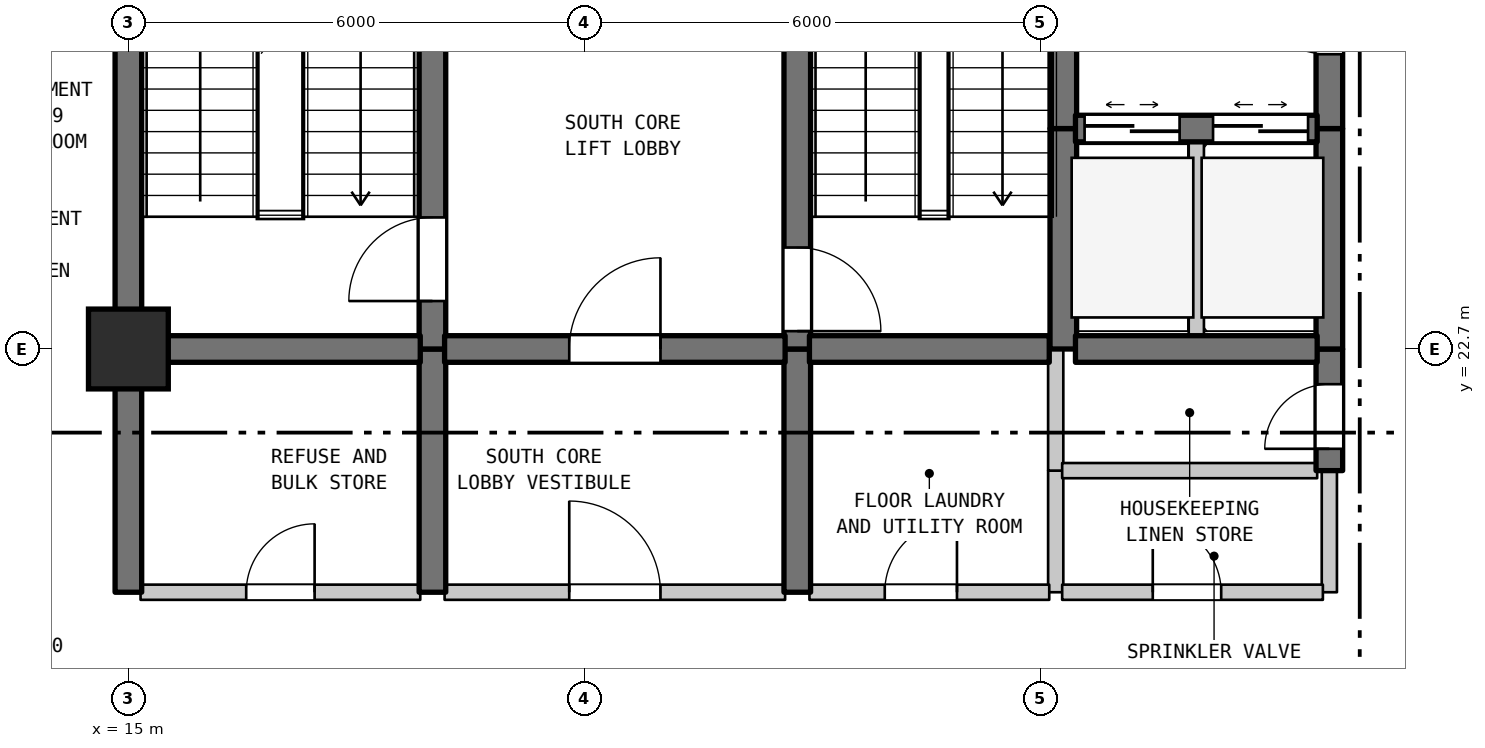
"""IFC4 building model, lengths in metres.
Left out: names, types, materials, properties, quantities, classifications, styles, units other than length and angle.
Written with IfcOpenShell. Run it as: python <this file> out.ifc"""

import sys

from ifc_helpers import new_model, si_unit, direction, frame, frame_2d, origin, origin_2d, place, context, subcontext, project, spatial, rectangle, extrude, element, fill, save


model = new_model("IFC4")
c1 = context("Model", 3, precision=1e-05, world=origin(), true_north=direction((0.0, 1.0)))
c2 = subcontext(c1, "Body", "Model", "MODEL_VIEW")
j1 = project(units=[si_unit("LENGTHUNIT", "METRE"), si_unit("PLANEANGLEUNIT", "RADIAN")], contexts=[c1])
p1 = place(None, origin())
s1 = spatial("IfcSite", under=j1, at=p1, CompositionType="ELEMENT")
p2 = place(p1, origin())
s2 = spatial("IfcBuilding", under=s1, at=p2, CompositionType="ELEMENT")
p3 = place(p2, frame((0.0, 0.0, 113.1)))
s3 = spatial("IfcBuildingStorey", under=s2, at=p3, CompositionType="ELEMENT", Elevation=113.1)
p4 = place(p3, frame((15.0, 22.7, 0.0), z_axis=(0.0, 0.0, 1.0), x_axis=(1.0, 0.0, 0.0)))
e1 = element("IfcColumn", 1, at=p4, inside=s3, PredefinedType="COLUMN", context=c2, shape_type="SweptSolid", body=[
    extrude(rectangle(XDim=1.05, YDim=1.05, at=origin_2d()), origin(), (0.0, 0.0, 1.0), 3.7),
])
p5 = place(p3, frame((15.0, 19.5, 0.0), z_axis=(0.0, 0.0, 1.0), x_axis=(0.0, 1.0, 0.0)))
e2 = element("IfcWall", 2, at=p5, inside=s3, PredefinedType="SHEAR", context=c2, shape_type="SweptSolid", body=[
    extrude(rectangle(XDim=3.2, YDim=0.35, at=frame_2d((1.6, 0.0))), origin(), (0.0, 0.0, 1.0), 3.385),
])
p6 = place(p3, frame((15.0, 22.7, 0.0), z_axis=(0.0, 0.0, 1.0), x_axis=(0.0, 1.0, 0.0)))
e3 = element("IfcWall", 3, at=p6, inside=s3, PredefinedType="SHEAR", context=c2, shape_type="SweptSolid", body=[
    extrude(rectangle(XDim=6.8, YDim=0.35, at=frame_2d((3.4, 0.0))), origin(), (0.0, 0.0, 1.0), 3.385),
])
p7 = place(p3, frame((19.0, 19.5, 0.0), z_axis=(0.0, 0.0, 1.0), x_axis=(0.0, 1.0, 0.0)))
e4 = element("IfcWall", 4, at=p7, inside=s3, PredefinedType="SHEAR", context=c2, shape_type="SweptSolid", body=[
    extrude(rectangle(XDim=3.2, YDim=0.35, at=frame_2d((1.6, 0.0))), origin(), (0.0, 0.0, 1.0), 3.385),
])
p8 = place(p3, frame((19.0, 22.7, 0.0), z_axis=(0.0, 0.0, 1.0), x_axis=(0.0, 1.0, 0.0)))
e5 = element("IfcWall", 5, at=p8, inside=s3, PredefinedType="SHEAR", context=c2, shape_type="SweptSolid", body=[
    extrude(rectangle(XDim=5.5, YDim=0.35, at=frame_2d((2.75, 0.0))), origin(), (0.0, 0.0, 1.0), 3.385),
])
p9 = place(p8, frame((0.631, 0.0, 0.0)))
e6 = element("IfcOpeningElement", 6, at=p9, cuts=e5, PredefinedType="OPENING", context=c2, shape_type="SweptSolid", body=[
    extrude(rectangle(XDim=1.1, YDim=2.15, at=frame_2d((0.55, 1.075))), frame((0.0, 0.185, 0.0), z_axis=(0.0, -1.0, 0.0), x_axis=(1.0, 0.0, 0.0)), (0.0, 0.0, 1.0), 0.37),
])
p10 = place(p3, frame((23.8, 19.5, 0.0), z_axis=(0.0, 0.0, 1.0), x_axis=(0.0, 1.0, 0.0)))
e7 = element("IfcWall", 7, at=p10, inside=s3, PredefinedType="SHEAR", context=c2, shape_type="SweptSolid", body=[
    extrude(rectangle(XDim=3.2, YDim=0.35, at=frame_2d((1.6, 0.0))), origin(), (0.0, 0.0, 1.0), 3.385),
])
p11 = place(p3, frame((23.8, 22.7, 0.0), z_axis=(0.0, 0.0, 1.0), x_axis=(0.0, 1.0, 0.0)))
e8 = element("IfcWall", 8, at=p11, inside=s3, PredefinedType="SHEAR", context=c2, shape_type="SweptSolid", body=[
    extrude(rectangle(XDim=5.5, YDim=0.35, at=frame_2d((2.75, 0.0))), origin(), (0.0, 0.0, 1.0), 3.385),
])
p12 = place(p11, frame((0.235, 0.0, 0.0)))
e9 = element("IfcOpeningElement", 9, at=p12, cuts=e8, PredefinedType="OPENING", context=c2, shape_type="SweptSolid", body=[
    extrude(rectangle(XDim=1.1, YDim=2.15, at=frame_2d((0.55, 1.075))), frame((0.0, 0.185, 0.0), z_axis=(0.0, -1.0, 0.0), x_axis=(1.0, 0.0, 0.0)), (0.0, 0.0, 1.0), 0.37),
])
p13 = place(p3, frame((27.2, 19.5, 0.0), z_axis=(0.0, 0.0, 1.0), x_axis=(0.0, 1.0, 0.0)))
e10 = element("IfcWall", 10, at=p13, inside=s3, PredefinedType="STANDARD", context=c2, shape_type="SweptSolid", body=[
    extrude(rectangle(XDim=1.6, YDim=0.2, at=frame_2d((0.8, 0.0))), origin(), (0.0, 0.0, 1.0), 3.385),
])
p14 = place(p3, frame((27.2, 21.1, 0.0), z_axis=(0.0, 0.0, 1.0), x_axis=(0.0, 1.0, 0.0)))
e11 = element("IfcWall", 11, at=p14, inside=s3, PredefinedType="STANDARD", context=c2, shape_type="SweptSolid", body=[
    extrude(rectangle(XDim=1.6, YDim=0.2, at=frame_2d((0.8, 0.0))), origin(), (0.0, 0.0, 1.0), 3.385),
])
p15 = place(p3, frame((27.3, 22.7, 0.0), z_axis=(0.0, 0.0, 1.0), x_axis=(0.0, 1.0, 0.0)))
e12 = element("IfcWall", 12, at=p15, inside=s3, PredefinedType="SHEAR", context=c2, shape_type="SweptSolid", body=[
    extrude(rectangle(XDim=2.9, YDim=0.35, at=frame_2d((1.45, 0.0))), origin(), (0.0, 0.0, 1.0), 3.385),
])
p16 = place(p3, frame((27.3, 25.6, 0.0), z_axis=(0.0, 0.0, 1.0), x_axis=(0.0, 1.0, 0.0)))
e13 = element("IfcWall", 13, at=p16, inside=s3, PredefinedType="SHEAR", context=c2, shape_type="SweptSolid", body=[
    extrude(rectangle(XDim=3.3, YDim=0.35, at=frame_2d((1.65, 0.0))), origin(), (0.0, 0.0, 1.0), 3.385),
])
p17 = place(p3, frame((29.05, 22.7, 0.0), z_axis=(0.0, 0.0, 1.0), x_axis=(0.0, 1.0, 0.0)))
e14 = element("IfcWall", 14, at=p17, inside=s3, PredefinedType="STANDARD", context=c2, shape_type="SweptSolid", body=[
    extrude(rectangle(XDim=2.9, YDim=0.2, at=frame_2d((1.45, 0.0))), origin(), (0.0, 0.0, 1.0), 3.385),
])
p18 = place(p3, frame((30.8, 19.5, 0.0), z_axis=(0.0, 0.0, 1.0), x_axis=(0.0, 1.0, 0.0)))
e15 = element("IfcWall", 15, at=p18, inside=s3, PredefinedType="STANDARD", context=c2, shape_type="SweptSolid", body=[
    extrude(rectangle(XDim=1.6, YDim=0.2, at=frame_2d((0.8, 0.0))), origin(), (0.0, 0.0, 1.0), 3.385),
])
p19 = place(p3, frame((30.8, 21.1, 0.0), z_axis=(0.0, 0.0, 1.0), x_axis=(0.0, 1.0, 0.0)))
e16 = element("IfcWall", 16, at=p19, inside=s3, PredefinedType="SHEAR", context=c2, shape_type="SweptSolid", body=[
    extrude(rectangle(XDim=1.6, YDim=0.35, at=frame_2d((0.8, 0.0))), origin(), (0.0, 0.0, 1.0), 3.385),
])
p20 = place(p19, frame((0.287, 0.0, 0.0)))
e17 = element("IfcOpeningElement", 17, at=p20, cuts=e16, PredefinedType="OPENING", context=c2, shape_type="SweptSolid", body=[
    extrude(rectangle(XDim=0.85, YDim=2.1, at=frame_2d((0.425, 1.05))), frame((0.0, 0.185, 0.0), z_axis=(0.0, -1.0, 0.0), x_axis=(1.0, 0.0, 0.0)), (0.0, 0.0, 1.0), 0.37),
])
p21 = place(p3, frame((30.8, 22.7, 0.0), z_axis=(0.0, 0.0, 1.0), x_axis=(0.0, 1.0, 0.0)))
e18 = element("IfcWall", 18, at=p21, inside=s3, PredefinedType="SHEAR", context=c2, shape_type="SweptSolid", body=[
    extrude(rectangle(XDim=2.9, YDim=0.35, at=frame_2d((1.45, 0.0))), origin(), (0.0, 0.0, 1.0), 3.385),
])
p22 = place(p3, frame((30.8, 25.6, 0.0), z_axis=(0.0, 0.0, 1.0), x_axis=(0.0, 1.0, 0.0)))
e19 = element("IfcWall", 19, at=p22, inside=s3, PredefinedType="SHEAR", context=c2, shape_type="SweptSolid", body=[
    extrude(rectangle(XDim=3.3, YDim=0.35, at=frame_2d((1.65, 0.0))), origin(), (0.0, 0.0, 1.0), 3.385),
])
p23 = place(p22, frame((0.978, 0.0, 0.0)))
e20 = element("IfcOpeningElement", 20, at=p23, cuts=e19, PredefinedType="OPENING", context=c2, shape_type="SweptSolid", body=[
    extrude(rectangle(XDim=1.2, YDim=2.2, at=frame_2d((0.6, 1.1))), frame((0.0, 0.185, 0.0), z_axis=(0.0, -1.0, 0.0), x_axis=(1.0, 0.0, 0.0)), (0.0, 0.0, 1.0), 0.37),
])
p24 = place(p3, frame((15.16, 19.5, 0.0), z_axis=(0.0, 0.0, 1.0), x_axis=(1.0, 0.0, 0.0)))
e21 = element("IfcWall", 21, at=p24, inside=s3, PredefinedType="STANDARD", context=c2, shape_type="SweptSolid", body=[
    extrude(rectangle(XDim=3.68, YDim=0.2, at=frame_2d((1.84, 0.0))), origin(), (0.0, 0.0, 1.0), 3.385),
])
p25 = place(p24, frame((1.39, 0.0, 0.0)))
e22 = element("IfcOpeningElement", 22, at=p25, cuts=e21, PredefinedType="OPENING", context=c2, shape_type="SweptSolid", body=[
    extrude(rectangle(XDim=0.9, YDim=2.15, at=frame_2d((0.45, 1.075))), frame((0.0, 0.11, 0.0), z_axis=(0.0, -1.0, 0.0), x_axis=(1.0, 0.0, 0.0)), (0.0, 0.0, 1.0), 0.22),
])
p26 = place(p3, frame((19.16, 19.5, 0.0), z_axis=(0.0, 0.0, 1.0), x_axis=(1.0, 0.0, 0.0)))
e23 = element("IfcWall", 23, at=p26, inside=s3, PredefinedType="STANDARD", context=c2, shape_type="SweptSolid", body=[
    extrude(rectangle(XDim=4.48, YDim=0.2, at=frame_2d((2.24, 0.0))), origin(), (0.0, 0.0, 1.0), 3.385),
])
p27 = place(p26, frame((1.64, 0.0, 0.0)))
e24 = element("IfcOpeningElement", 24, at=p27, cuts=e23, PredefinedType="OPENING", context=c2, shape_type="SweptSolid", body=[
    extrude(rectangle(XDim=1.2, YDim=2.2, at=frame_2d((0.6, 1.1))), frame((0.0, 0.11, 0.0), z_axis=(0.0, -1.0, 0.0), x_axis=(1.0, 0.0, 0.0)), (0.0, 0.0, 1.0), 0.22),
])
p28 = place(p3, frame((23.96, 19.5, 0.0), z_axis=(0.0, 0.0, 1.0), x_axis=(1.0, 0.0, 0.0)))
e25 = element("IfcWall", 25, at=p28, inside=s3, PredefinedType="STANDARD", context=c2, shape_type="SweptSolid", body=[
    extrude(rectangle(XDim=3.155, YDim=0.2, at=frame_2d((1.578, 0.0))), origin(), (0.0, 0.0, 1.0), 3.385),
])
p29 = place(p28, frame((0.991, 0.0, 0.0)))
e26 = element("IfcOpeningElement", 26, at=p29, cuts=e25, PredefinedType="OPENING", context=c2, shape_type="SweptSolid", body=[
    extrude(rectangle(XDim=0.95, YDim=2.15, at=frame_2d((0.475, 1.075))), frame((0.0, 0.11, 0.0), z_axis=(0.0, -1.0, 0.0), x_axis=(1.0, 0.0, 0.0)), (0.0, 0.0, 1.0), 0.22),
])
p30 = place(p3, frame((27.285, 19.5, 0.0), z_axis=(0.0, 0.0, 1.0), x_axis=(1.0, 0.0, 0.0)))
e27 = element("IfcWall", 27, at=p30, inside=s3, PredefinedType="STANDARD", context=c2, shape_type="SweptSolid", body=[
    extrude(rectangle(XDim=3.43, YDim=0.2, at=frame_2d((1.715, 0.0))), origin(), (0.0, 0.0, 1.0), 3.385),
])
p31 = place(p30, frame((1.192, 0.0, 0.0)))
e28 = element("IfcOpeningElement", 28, at=p31, cuts=e27, PredefinedType="OPENING", context=c2, shape_type="SweptSolid", body=[
    extrude(rectangle(XDim=0.9, YDim=2.15, at=frame_2d((0.45, 1.075))), frame((0.0, 0.11, 0.0), z_axis=(0.0, -1.0, 0.0), x_axis=(1.0, 0.0, 0.0)), (0.0, 0.0, 1.0), 0.22),
])
p32 = place(p3, frame((27.285, 21.1, 0.0), z_axis=(0.0, 0.0, 1.0), x_axis=(1.0, 0.0, 0.0)))
e29 = element("IfcWall", 29, at=p32, inside=s3, PredefinedType="STANDARD", context=c2, shape_type="SweptSolid", body=[
    extrude(rectangle(XDim=3.355, YDim=0.2, at=frame_2d((1.677, 0.0))), origin(), (0.0, 0.0, 1.0), 3.385),
])
p33 = place(p3, frame((15.16, 22.7, 0.0), z_axis=(0.0, 0.0, 1.0), x_axis=(1.0, 0.0, 0.0)))
e30 = element("IfcWall", 30, at=p33, inside=s3, PredefinedType="SHEAR", context=c2, shape_type="SweptSolid", body=[
    extrude(rectangle(XDim=3.68, YDim=0.35, at=frame_2d((1.84, 0.0))), origin(), (0.0, 0.0, 1.0), 3.385),
])
p34 = place(p3, frame((19.16, 22.7, 0.0), z_axis=(0.0, 0.0, 1.0), x_axis=(1.0, 0.0, 0.0)))
e31 = element("IfcWall", 31, at=p34, inside=s3, PredefinedType="SHEAR", context=c2, shape_type="SweptSolid", body=[
    extrude(rectangle(XDim=4.48, YDim=0.35, at=frame_2d((2.24, 0.0))), origin(), (0.0, 0.0, 1.0), 3.385),
])
p35 = place(p34, frame((1.64, 0.0, 0.0)))
e32 = element("IfcOpeningElement", 32, at=p35, cuts=e31, PredefinedType="OPENING", context=c2, shape_type="SweptSolid", body=[
    extrude(rectangle(XDim=1.2, YDim=2.2, at=frame_2d((0.6, 1.1))), frame((0.0, 0.185, 0.0), z_axis=(0.0, -1.0, 0.0), x_axis=(1.0, 0.0, 0.0)), (0.0, 0.0, 1.0), 0.37),
])
p36 = place(p3, frame((23.96, 22.7, 0.0), z_axis=(0.0, 0.0, 1.0), x_axis=(1.0, 0.0, 0.0)))
e33 = element("IfcWall", 33, at=p36, inside=s3, PredefinedType="SHEAR", context=c2, shape_type="SweptSolid", body=[
    extrude(rectangle(XDim=3.155, YDim=0.35, at=frame_2d((1.578, 0.0))), origin(), (0.0, 0.0, 1.0), 3.385),
])
p37 = place(p3, frame((27.46, 22.7, 0.0), z_axis=(0.0, 0.0, 1.0), x_axis=(1.0, 0.0, 0.0)))
e34 = element("IfcWall", 34, at=p37, inside=s3, PredefinedType="SHEAR", context=c2, shape_type="SweptSolid", body=[
    extrude(rectangle(XDim=3.18, YDim=0.35, at=frame_2d((1.59, 0.0))), origin(), (0.0, 0.0, 1.0), 3.385),
])
p38 = place(p3, frame((27.46, 25.6, 0.0), z_axis=(0.0, 0.0, 1.0), x_axis=(1.0, 0.0, 0.0)))
e35 = element("IfcWall", 35, at=p38, inside=s3, PredefinedType="SHEAR", context=c2, shape_type="SweptSolid", body=[
    extrude(rectangle(XDim=3.18, YDim=0.35, at=frame_2d((1.59, 0.0))), origin(), (0.0, 0.0, 1.0), 3.385),
])
p39 = place(p38, frame((0.12, 0.0, 0.0)))
e36 = element("IfcOpeningElement", 36, at=p39, cuts=e35, PredefinedType="OPENING", context=c2, shape_type="SweptSolid", body=[
    extrude(rectangle(XDim=1.25, YDim=2.2, at=frame_2d((0.625, 1.1))), frame((0.0, 0.185, 0.0), z_axis=(0.0, -1.0, 0.0), x_axis=(1.0, 0.0, 0.0)), (0.0, 0.0, 1.0), 0.37),
])
p40 = place(p38, frame((1.81, 0.0, 0.0)))
e37 = element("IfcOpeningElement", 37, at=p40, cuts=e35, PredefinedType="OPENING", context=c2, shape_type="SweptSolid", body=[
    extrude(rectangle(XDim=1.25, YDim=2.2, at=frame_2d((0.625, 1.1))), frame((0.0, 0.185, 0.0), z_axis=(0.0, -1.0, 0.0), x_axis=(1.0, 0.0, 0.0)), (0.0, 0.0, 1.0), 0.37),
])
p41 = place(p9, origin())
e38 = element("IfcDoor", 38, at=p41, inside=s3, OperationType="SINGLE_SWING_LEFT", PredefinedType="DOOR", context=c2, shape_type="SweptSolid", body=[
    extrude(rectangle(XDim=1.1, YDim=2.15, at=frame_2d((0.55, 1.075))), frame((0.0, 0.025, 0.0), z_axis=(0.0, -1.0, 0.0), x_axis=(1.0, 0.0, 0.0)), (0.0, 0.0, 1.0), 0.05),
])
fill(e6, e38)
p42 = place(p12, frame((1.1, 0.0, 0.0), z_axis=(0.0, 0.0, 1.0), x_axis=(-1.0, 0.0, 0.0)))
e39 = element("IfcDoor", 39, at=p42, inside=s3, OperationType="SINGLE_SWING_LEFT", PredefinedType="DOOR", context=c2, shape_type="SweptSolid", body=[
    extrude(rectangle(XDim=1.1, YDim=2.15, at=frame_2d((0.55, 1.075))), frame((0.0, 0.025, 0.0), z_axis=(0.0, -1.0, 0.0), x_axis=(1.0, 0.0, 0.0)), (0.0, 0.0, 1.0), 0.05),
])
fill(e9, e39)
p43 = place(p20, origin())
e40 = element("IfcDoor", 40, at=p43, inside=s3, OperationType="SINGLE_SWING_LEFT", PredefinedType="DOOR", context=c2, shape_type="SweptSolid", body=[
    extrude(rectangle(XDim=0.85, YDim=2.1, at=frame_2d((0.425, 1.05))), frame((0.0, 0.025, 0.0), z_axis=(0.0, -1.0, 0.0), x_axis=(1.0, 0.0, 0.0)), (0.0, 0.0, 1.0), 0.05),
])
fill(e17, e40)
p44 = place(p23, origin())
e41 = element("IfcDoor", 41, at=p44, inside=s3, OperationType="SINGLE_SWING_RIGHT", PredefinedType="DOOR", context=c2, shape_type="SweptSolid", body=[
    extrude(rectangle(XDim=1.2, YDim=2.2, at=frame_2d((0.6, 1.1))), frame((0.0, 0.025, 0.0), z_axis=(0.0, -1.0, 0.0), x_axis=(1.0, 0.0, 0.0)), (0.0, 0.0, 1.0), 0.05),
])
fill(e20, e41)
p45 = place(p25, origin())
e42 = element("IfcDoor", 42, at=p45, inside=s3, OperationType="SINGLE_SWING_RIGHT", PredefinedType="DOOR", context=c2, shape_type="SweptSolid", body=[
    extrude(rectangle(XDim=0.9, YDim=2.15, at=frame_2d((0.45, 1.075))), frame((0.0, 0.025, 0.0), z_axis=(0.0, -1.0, 0.0), x_axis=(1.0, 0.0, 0.0)), (0.0, 0.0, 1.0), 0.05),
])
fill(e22, e42)
p46 = place(p27, origin())
e43 = element("IfcDoor", 43, at=p46, inside=s3, OperationType="SINGLE_SWING_LEFT", PredefinedType="DOOR", context=c2, shape_type="SweptSolid", body=[
    extrude(rectangle(XDim=1.2, YDim=2.2, at=frame_2d((0.6, 1.1))), frame((0.0, 0.025, 0.0), z_axis=(0.0, -1.0, 0.0), x_axis=(1.0, 0.0, 0.0)), (0.0, 0.0, 1.0), 0.05),
])
fill(e24, e43)
p47 = place(p29, origin())
e44 = element("IfcDoor", 44, at=p47, inside=s3, OperationType="SINGLE_SWING_RIGHT", PredefinedType="DOOR", context=c2, shape_type="SweptSolid", body=[
    extrude(rectangle(XDim=0.95, YDim=2.15, at=frame_2d((0.475, 1.075))), frame((0.0, 0.025, 0.0), z_axis=(0.0, -1.0, 0.0), x_axis=(1.0, 0.0, 0.0)), (0.0, 0.0, 1.0), 0.05),
])
fill(e26, e44)
p48 = place(p31, origin())
e45 = element("IfcDoor", 45, at=p48, inside=s3, OperationType="SINGLE_SWING_LEFT", PredefinedType="DOOR", context=c2, shape_type="SweptSolid", body=[
    extrude(rectangle(XDim=0.9, YDim=2.15, at=frame_2d((0.45, 1.075))), frame((0.0, 0.025, 0.0), z_axis=(0.0, -1.0, 0.0), x_axis=(1.0, 0.0, 0.0)), (0.0, 0.0, 1.0), 0.05),
])
fill(e28, e45)
p49 = place(p35, origin())
e46 = element("IfcDoor", 46, at=p49, inside=s3, OperationType="SINGLE_SWING_RIGHT", PredefinedType="DOOR", context=c2, shape_type="SweptSolid", body=[
    extrude(rectangle(XDim=1.2, YDim=2.2, at=frame_2d((0.6, 1.1))), frame((0.0, 0.025, 0.0), z_axis=(0.0, -1.0, 0.0), x_axis=(1.0, 0.0, 0.0)), (0.0, 0.0, 1.0), 0.05),
])
fill(e32, e46)
p50 = place(p39, origin())
e47 = element("IfcDoor", 47, at=p50, inside=s3, OperationType="DOUBLE_DOOR_SLIDING", PredefinedType="DOOR", context=c2, shape_type="SweptSolid", body=[
    extrude(rectangle(XDim=1.25, YDim=2.2, at=frame_2d((0.625, 1.1))), frame((0.0, 0.025, 0.0), z_axis=(0.0, -1.0, 0.0), x_axis=(1.0, 0.0, 0.0)), (0.0, 0.0, 1.0), 0.05),
])
fill(e36, e47)
p51 = place(p40, origin())
e48 = element("IfcDoor", 48, at=p51, inside=s3, OperationType="DOUBLE_DOOR_SLIDING", PredefinedType="DOOR", context=c2, shape_type="SweptSolid", body=[
    extrude(rectangle(XDim=1.25, YDim=2.2, at=frame_2d((0.625, 1.1))), frame((0.0, 0.025, 0.0), z_axis=(0.0, -1.0, 0.0), x_axis=(1.0, 0.0, 0.0)), (0.0, 0.0, 1.0), 0.05),
])
fill(e37, e48)
save(model, sys.argv[1])
